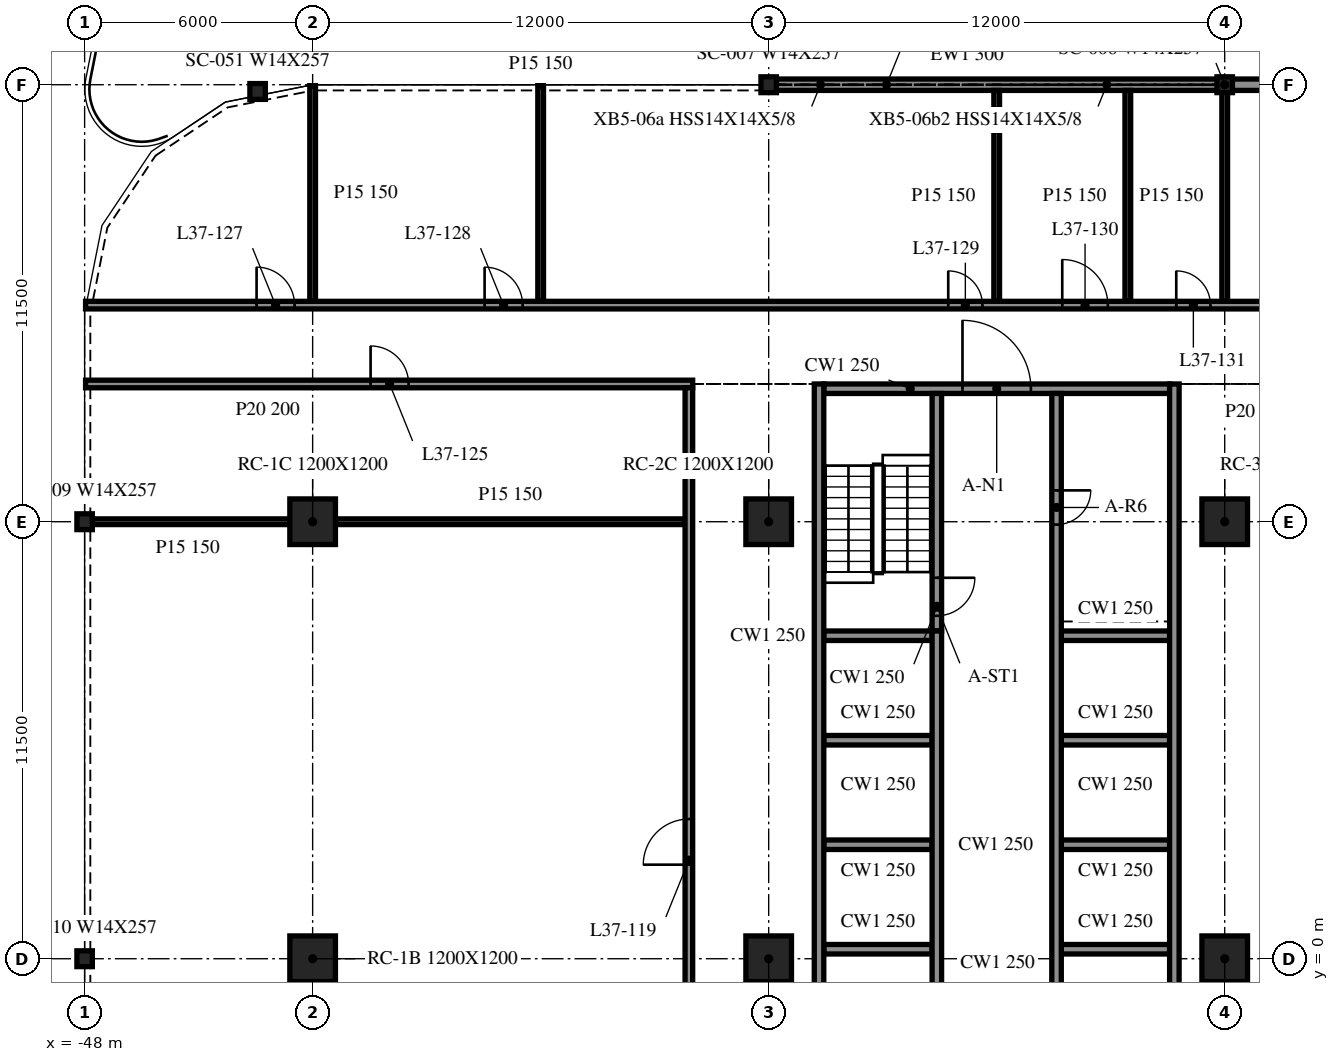
"""IFC4 building model, lengths in metres.
Left out: names, types, materials, properties, quantities, classifications, styles, units other than length and angle.
Written with IfcOpenShell. Run it as: python <this file> out.ifc"""

import sys

from ifc_helpers import new_model, si_unit, direction, frame, frame_2d, origin, origin_2d, place, context, subcontext, project, spatial, rectangle, i_section, extrude, element, fill, save


model = new_model("IFC4")
c1 = context("Model", 3, precision=1e-05, world=origin(), true_north=direction((0.0, 1.0)))
c2 = subcontext(c1, "Body", "Model", "MODEL_VIEW")
j1 = project(units=[si_unit("LENGTHUNIT", "METRE"), si_unit("PLANEANGLEUNIT", "RADIAN")], contexts=[c1])
p1 = place(None, origin())
s1 = spatial("IfcSite", under=j1, at=p1, CompositionType="ELEMENT")
p2 = place(p1, origin())
s2 = spatial("IfcBuilding", under=s1, at=p2, CompositionType="ELEMENT")
p3 = place(p2, frame((0.0, 0.0, 159.2)))
s3 = spatial("IfcBuildingStorey", under=s2, at=p3, CompositionType="ELEMENT", Elevation=159.2)
for number, where, z_axis, x_axis in (
    (1, (-42.0, 0.0, -0.34), (0.0, 0.0, 1.0), (1.0, 0.0, 0.0)),
    (2, (-42.0, 11.5, -0.34), (0.0, 0.0, 1.0), (1.0, 0.0, 0.0)),
    (3, (-30.0, 0.0, -0.34), (0.0, 0.0, 1.0), (1.0, 0.0, 0.0)),
    (4, (-30.0, 11.5, -0.34), (0.0, 0.0, 1.0), (1.0, 0.0, 0.0)),
    (5, (-18.0, 0.0, -0.34), (0.0, 0.0, 1.0), (1.0, 0.0, 0.0)),
    (6, (-18.0, 11.5, -0.34), (0.0, 0.0, 1.0), (1.0, 0.0, 0.0)),
):
    element("IfcColumn", number, at=place(p3, frame(where, z_axis=z_axis, x_axis=x_axis)), inside=s3, PredefinedType="COLUMN", context=c2, shape_type="SweptSolid", body=[
        extrude(rectangle(XDim=1.2, YDim=1.2, at=origin_2d()), origin(), (0.0, 0.0, 1.0), 3.8),
    ])
for number, where, z_axis, x_axis in (
    (7, (-18.0, 23.0, -0.34), (0.0, 0.0, 1.0), (1.0, 0.0, 0.0)),
    (8, (-30.0, 23.0, -0.34), (0.0, 0.0, 1.0), (1.0, 0.0, 0.0)),
    (9, (-43.448, 22.822, -0.34), (0.0, 0.0, 1.0), (1.0, 0.0, 0.0)),
    (10, (-48.0, 11.5, -0.34), (0.0, 0.0, 1.0), (1.0, 0.0, 0.0)),
    (11, (-48.0, 0.0, -0.34), (0.0, 0.0, 1.0), (1.0, 0.0, 0.0)),
):
    element("IfcColumn", number, at=place(p3, frame(where, z_axis=z_axis, x_axis=x_axis)), inside=s3, PredefinedType="COLUMN", context=c2, shape_type="SweptSolid", body=[
        extrude(i_section(OverallWidth=0.406, OverallDepth=0.417, WebThickness=0.03, FlangeThickness=0.048, at=origin_2d()), origin(), (0.0, 0.0, 1.0), 3.8),
    ])
p4 = place(p3, frame((-6.015, 23.0, 0.0), z_axis=(0.0, 0.0, 1.0), x_axis=(-1.0, 0.0, 0.0)))
e12 = element("IfcWall", 12, at=p4, inside=s3, PredefinedType="NOTDEFINED", context=c2, shape_type="SweptSolid", body=[
    extrude(rectangle(XDim=11.97, YDim=0.3, at=frame_2d((5.985, 0.0))), origin(), (0.0, 0.0, 1.0), 2.782),
])
p5 = place(p4, frame((4.485, 0.0, 0.0)))
e13 = element("IfcOpeningElement", 13, at=p5, cuts=e12, PredefinedType="OPENING", context=c2, shape_type="SweptSolid", body=[
    extrude(rectangle(XDim=3.0, YDim=2.4, at=frame_2d((1.5, 1.2))), frame((0.0, 0.16, 0.0), z_axis=(0.0, -1.0, 0.0), x_axis=(1.0, 0.0, 0.0)), (0.0, 0.0, 1.0), 0.32),
])
p6 = place(p3, frame((-18.015, 23.0, 0.0), z_axis=(0.0, 0.0, 1.0), x_axis=(-1.0, 0.0, 0.0)))
e14 = element("IfcWall", 14, at=p6, inside=s3, PredefinedType="NOTDEFINED", context=c2, shape_type="SweptSolid", body=[
    extrude(rectangle(XDim=11.97, YDim=0.3, at=frame_2d((5.985, 0.0))), origin(), (0.0, 0.0, 1.0), 2.782),
])
for number, where, z_axis, x_axis in (
    (15, (-28.675, 15.125, 0.0), (0.0, 0.0, 1.0), (0.0, -1.0, 0.0)),
    (16, (-19.325, -9.125, 0.0), (0.0, 0.0, 1.0), (0.0, 1.0, 0.0)),
):
    element("IfcWall", number, at=place(p3, frame(where, z_axis=z_axis, x_axis=x_axis)), inside=s3, PredefinedType="SOLIDWALL", context=c2, shape_type="SweptSolid", body=[
        extrude(rectangle(XDim=24.25, YDim=0.25, at=frame_2d((12.125, 0.0))), origin(), (0.0, 0.0, 1.0), 3.46),
    ])
p7 = place(p3, frame((-28.55, 15.0, 0.0), z_axis=(0.0, 0.0, 1.0), x_axis=(1.0, 0.0, 0.0)))
e17 = element("IfcWall", 17, at=p7, inside=s3, PredefinedType="SOLIDWALL", context=c2, shape_type="SweptSolid", body=[
    extrude(rectangle(XDim=9.1, YDim=0.25, at=frame_2d((4.55, 0.0))), origin(), (0.0, 0.0, 1.0), 3.46),
])
p8 = place(p7, frame((3.65, 0.0, 0.0)))
e18 = element("IfcOpeningElement", 18, at=p8, cuts=e17, PredefinedType="OPENING", context=c2, shape_type="SweptSolid", body=[
    extrude(rectangle(XDim=1.8, YDim=2.1, at=frame_2d((0.9, 1.05))), frame((0.0, 0.135, 0.0), z_axis=(0.0, -1.0, 0.0), x_axis=(1.0, 0.0, 0.0)), (0.0, 0.0, 1.0), 0.27),
])
p9 = place(p3, frame((-25.575, -8.875, 0.0), z_axis=(0.0, 0.0, 1.0), x_axis=(0.0, 1.0, 0.0)))
e19 = element("IfcWall", 19, at=p9, inside=s3, PredefinedType="SOLIDWALL", context=c2, shape_type="SweptSolid", body=[
    extrude(rectangle(XDim=17.5, YDim=0.25, at=frame_2d((8.75, 0.0))), origin(), (0.0, 0.0, 1.0), 3.46),
])
p10 = place(p9, frame((0.512, 0.0, 0.0)))
e20 = element("IfcOpeningElement", 20, at=p10, cuts=e19, PredefinedType="OPENING", context=c2, shape_type="SweptSolid", body=[
    extrude(rectangle(XDim=0.9, YDim=2.1, at=frame_2d((0.45, 1.05))), frame((0.0, 0.135, 0.0), z_axis=(0.0, -1.0, 0.0), x_axis=(1.0, 0.0, 0.0)), (0.0, 0.0, 1.0), 0.27),
])
p11 = place(p9, frame((3.587, 0.0, 0.0)))
e21 = element("IfcOpeningElement", 21, at=p11, cuts=e19, PredefinedType="OPENING", context=c2, shape_type="SweptSolid", body=[
    extrude(rectangle(XDim=0.9, YDim=2.1, at=frame_2d((0.45, 1.05))), frame((0.0, 0.135, 0.0), z_axis=(0.0, -1.0, 0.0), x_axis=(1.0, 0.0, 0.0)), (0.0, 0.0, 1.0), 0.27),
])
p12 = place(p3, frame((-25.575, 14.875, 0.0), z_axis=(0.0, 0.0, 1.0), x_axis=(0.0, -1.0, 0.0)))
e22 = element("IfcWall", 22, at=p12, inside=s3, PredefinedType="SOLIDWALL", context=c2, shape_type="SweptSolid", body=[
    extrude(rectangle(XDim=6.25, YDim=0.25, at=frame_2d((3.125, 0.0))), origin(), (0.0, 0.0, 1.0), 3.46),
])
p13 = place(p12, frame((4.85, 0.0, 0.0)))
e23 = element("IfcOpeningElement", 23, at=p13, cuts=e22, PredefinedType="OPENING", context=c2, shape_type="SweptSolid", body=[
    extrude(rectangle(XDim=1.0, YDim=2.1, at=frame_2d((0.5, 1.05))), frame((0.0, 0.135, 0.0), z_axis=(0.0, -1.0, 0.0), x_axis=(1.0, 0.0, 0.0)), (0.0, 0.0, 1.0), 0.27),
])
p14 = place(p3, frame((-22.425, 14.875, 0.0), z_axis=(0.0, 0.0, 1.0), x_axis=(0.0, -1.0, 0.0)))
e24 = element("IfcWall", 24, at=p14, inside=s3, PredefinedType="SOLIDWALL", context=c2, shape_type="SweptSolid", body=[
    extrude(rectangle(XDim=23.75, YDim=0.25, at=frame_2d((11.875, 0.0))), origin(), (0.0, 0.0, 1.0), 3.46),
])
p15 = place(p14, frame((22.337, 0.0, 0.0)))
e25 = element("IfcOpeningElement", 25, at=p15, cuts=e24, PredefinedType="OPENING", context=c2, shape_type="SweptSolid", body=[
    extrude(rectangle(XDim=0.9, YDim=2.1, at=frame_2d((0.45, 1.05))), frame((0.0, 0.135, 0.0), z_axis=(0.0, -1.0, 0.0), x_axis=(1.0, 0.0, 0.0)), (0.0, 0.0, 1.0), 0.27),
])
p16 = place(p14, frame((20.3, 0.0, 0.0)))
e26 = element("IfcOpeningElement", 26, at=p16, cuts=e24, PredefinedType="OPENING", context=c2, shape_type="SweptSolid", body=[
    extrude(rectangle(XDim=0.9, YDim=2.1, at=frame_2d((0.45, 1.05))), frame((0.0, 0.135, 0.0), z_axis=(0.0, -1.0, 0.0), x_axis=(1.0, 0.0, 0.0)), (0.0, 0.0, 1.0), 0.27),
])
p17 = place(p14, frame((18.262, 0.0, 0.0)))
e27 = element("IfcOpeningElement", 27, at=p17, cuts=e24, PredefinedType="OPENING", context=c2, shape_type="SweptSolid", body=[
    extrude(rectangle(XDim=0.9, YDim=2.1, at=frame_2d((0.45, 1.05))), frame((0.0, 0.135, 0.0), z_axis=(0.0, -1.0, 0.0), x_axis=(1.0, 0.0, 0.0)), (0.0, 0.0, 1.0), 0.27),
])
p18 = place(p14, frame((2.55, 0.0, 0.0)))
e28 = element("IfcOpeningElement", 28, at=p18, cuts=e24, PredefinedType="OPENING", context=c2, shape_type="SweptSolid", body=[
    extrude(rectangle(XDim=0.9, YDim=2.1, at=frame_2d((0.45, 1.05))), frame((0.0, 0.135, 0.0), z_axis=(0.0, -1.0, 0.0), x_axis=(1.0, 0.0, 0.0)), (0.0, 0.0, 1.0), 0.27),
])
for number, where, z_axis, x_axis in (
    (29, (-28.55, 0.25, 0.0), (0.0, 0.0, 1.0), (1.0, 0.0, 0.0)),
    (30, (-28.55, 3.0, 0.0), (0.0, 0.0, 1.0), (1.0, 0.0, 0.0)),
    (31, (-28.55, 5.75, 0.0), (0.0, 0.0, 1.0), (1.0, 0.0, 0.0)),
    (32, (-28.55, 8.5, 0.0), (0.0, 0.0, 1.0), (1.0, 0.0, 0.0)),
    (33, (-22.3, 0.25, 0.0), (0.0, 0.0, 1.0), (1.0, 0.0, 0.0)),
    (34, (-22.3, 3.0, 0.0), (0.0, 0.0, 1.0), (1.0, 0.0, 0.0)),
    (35, (-22.3, 5.75, 0.0), (0.0, 0.0, 1.0), (1.0, 0.0, 0.0)),
    (36, (-22.3, 8.5, 0.0), (0.0, 0.0, 1.0), (1.0, 0.0, 0.0)),
):
    element("IfcWall", number, at=place(p3, frame(where, z_axis=z_axis, x_axis=x_axis)), inside=s3, PredefinedType="SOLIDWALL", context=c2, shape_type="SweptSolid", body=[
        extrude(rectangle(XDim=2.85, YDim=0.25, at=frame_2d((1.425, 0.0))), origin(), (0.0, 0.0, 1.0), 3.46),
    ])
p19 = place(p3, frame((-47.975, 11.5, 0.0), z_axis=(0.0, 0.0, 1.0), x_axis=(1.0, 0.0, 0.0)))
e37 = element("IfcWall", 37, at=p19, inside=s3, PredefinedType="PARTITIONING", context=c2, shape_type="SweptSolid", body=[
    extrude(rectangle(XDim=5.375, YDim=0.15, at=frame_2d((2.688, 0.0))), origin(), (0.0, 0.0, 1.0), 3.46),
])
p20 = place(p3, frame((-41.4, 11.5, 0.0), z_axis=(0.0, 0.0, 1.0), x_axis=(1.0, 0.0, 0.0)))
e38 = element("IfcWall", 38, at=p20, inside=s3, PredefinedType="PARTITIONING", context=c2, shape_type="SweptSolid", body=[
    extrude(rectangle(XDim=9.2, YDim=0.15, at=frame_2d((4.6, 0.0))), origin(), (0.0, 0.0, 1.0), 3.46),
])
p21 = place(p3, frame((-47.975, 15.125, 0.0), z_axis=(0.0, 0.0, 1.0), x_axis=(1.0, 0.0, 0.0)))
e39 = element("IfcWall", 39, at=p21, inside=s3, PredefinedType="PARTITIONING", context=c2, shape_type="SweptSolid", body=[
    extrude(rectangle(XDim=15.975, YDim=0.2, at=frame_2d((7.988, 0.0))), origin(), (0.0, 0.0, 1.0), 3.46),
])
p22 = place(p21, frame((7.5, 0.0, 0.0)))
e40 = element("IfcOpeningElement", 40, at=p22, cuts=e39, PredefinedType="OPENING", context=c2, shape_type="SweptSolid", body=[
    extrude(rectangle(XDim=1.0, YDim=2.1, at=frame_2d((0.5, 1.05))), frame((0.0, 0.11, 0.0), z_axis=(0.0, -1.0, 0.0), x_axis=(1.0, 0.0, 0.0)), (0.0, 0.0, 1.0), 0.22),
])
p23 = place(p3, frame((-47.975, 17.2, 0.0), z_axis=(0.0, 0.0, 1.0), x_axis=(1.0, 0.0, 0.0)))
e41 = element("IfcWall", 41, at=p23, inside=s3, PredefinedType="PARTITIONING", context=c2, shape_type="SweptSolid", body=[
    extrude(rectangle(XDim=95.95, YDim=0.2, at=frame_2d((47.975, 0.0))), origin(), (0.0, 0.0, 1.0), 3.46),
])
p24 = place(p23, frame((4.5, 0.0, 0.0)))
e42 = element("IfcOpeningElement", 42, at=p24, cuts=e41, PredefinedType="OPENING", context=c2, shape_type="SweptSolid", body=[
    extrude(rectangle(XDim=1.0, YDim=2.1, at=frame_2d((0.5, 1.05))), frame((0.0, 0.11, 0.0), z_axis=(0.0, -1.0, 0.0), x_axis=(1.0, 0.0, 0.0)), (0.0, 0.0, 1.0), 0.22),
])
p25 = place(p23, frame((10.5, 0.0, 0.0)))
e43 = element("IfcOpeningElement", 43, at=p25, cuts=e41, PredefinedType="OPENING", context=c2, shape_type="SweptSolid", body=[
    extrude(rectangle(XDim=1.0, YDim=2.1, at=frame_2d((0.5, 1.05))), frame((0.0, 0.11, 0.0), z_axis=(0.0, -1.0, 0.0), x_axis=(1.0, 0.0, 0.0)), (0.0, 0.0, 1.0), 0.22),
])
p26 = place(p23, frame((22.7, 0.0, 0.0)))
e44 = element("IfcOpeningElement", 44, at=p26, cuts=e41, PredefinedType="OPENING", context=c2, shape_type="SweptSolid", body=[
    extrude(rectangle(XDim=0.9, YDim=2.1, at=frame_2d((0.45, 1.05))), frame((0.0, 0.11, 0.0), z_axis=(0.0, -1.0, 0.0), x_axis=(1.0, 0.0, 0.0)), (0.0, 0.0, 1.0), 0.22),
])
p27 = place(p23, frame((25.7, 0.0, 0.0)))
e45 = element("IfcOpeningElement", 45, at=p27, cuts=e41, PredefinedType="OPENING", context=c2, shape_type="SweptSolid", body=[
    extrude(rectangle(XDim=1.2, YDim=2.1, at=frame_2d((0.6, 1.05))), frame((0.0, 0.11, 0.0), z_axis=(0.0, -1.0, 0.0), x_axis=(1.0, 0.0, 0.0)), (0.0, 0.0, 1.0), 0.22),
])
p28 = place(p23, frame((28.7, 0.0, 0.0)))
e46 = element("IfcOpeningElement", 46, at=p28, cuts=e41, PredefinedType="OPENING", context=c2, shape_type="SweptSolid", body=[
    extrude(rectangle(XDim=0.9, YDim=2.1, at=frame_2d((0.45, 1.05))), frame((0.0, 0.11, 0.0), z_axis=(0.0, -1.0, 0.0), x_axis=(1.0, 0.0, 0.0)), (0.0, 0.0, 1.0), 0.22),
])
p29 = place(p23, frame((36.7, 0.0, 0.0)))
e47 = element("IfcOpeningElement", 47, at=p29, cuts=e41, PredefinedType="OPENING", context=c2, shape_type="SweptSolid", body=[
    extrude(rectangle(XDim=1.0, YDim=2.1, at=frame_2d((0.5, 1.05))), frame((0.0, 0.11, 0.0), z_axis=(0.0, -1.0, 0.0), x_axis=(1.0, 0.0, 0.0)), (0.0, 0.0, 1.0), 0.22),
])
p30 = place(p23, frame((46.5, 0.0, 0.0)))
e48 = element("IfcOpeningElement", 48, at=p30, cuts=e41, PredefinedType="OPENING", context=c2, shape_type="SweptSolid", body=[
    extrude(rectangle(XDim=1.0, YDim=2.1, at=frame_2d((0.5, 1.05))), frame((0.0, 0.11, 0.0), z_axis=(0.0, -1.0, 0.0), x_axis=(1.0, 0.0, 0.0)), (0.0, 0.0, 1.0), 0.22),
])
p31 = place(p23, frame((48.1, 0.0, 0.0)))
e49 = element("IfcOpeningElement", 49, at=p31, cuts=e41, PredefinedType="OPENING", context=c2, shape_type="SweptSolid", body=[
    extrude(rectangle(XDim=0.9, YDim=2.1, at=frame_2d((0.45, 1.05))), frame((0.0, 0.11, 0.0), z_axis=(0.0, -1.0, 0.0), x_axis=(1.0, 0.0, 0.0)), (0.0, 0.0, 1.0), 0.22),
])
p32 = place(p23, frame((51.5, 0.0, 0.0)))
e50 = element("IfcOpeningElement", 50, at=p32, cuts=e41, PredefinedType="OPENING", context=c2, shape_type="SweptSolid", body=[
    extrude(rectangle(XDim=1.2, YDim=2.1, at=frame_2d((0.6, 1.05))), frame((0.0, 0.11, 0.0), z_axis=(0.0, -1.0, 0.0), x_axis=(1.0, 0.0, 0.0)), (0.0, 0.0, 1.0), 0.22),
])
p33 = place(p23, frame((54.1, 0.0, 0.0)))
e51 = element("IfcOpeningElement", 51, at=p33, cuts=e41, PredefinedType="OPENING", context=c2, shape_type="SweptSolid", body=[
    extrude(rectangle(XDim=0.9, YDim=2.1, at=frame_2d((0.45, 1.05))), frame((0.0, 0.11, 0.0), z_axis=(0.0, -1.0, 0.0), x_axis=(1.0, 0.0, 0.0)), (0.0, 0.0, 1.0), 0.22),
])
p34 = place(p23, frame((62.3, 0.0, 0.0)))
e52 = element("IfcOpeningElement", 52, at=p34, cuts=e41, PredefinedType="OPENING", context=c2, shape_type="SweptSolid", body=[
    extrude(rectangle(XDim=1.0, YDim=2.1, at=frame_2d((0.5, 1.05))), frame((0.0, 0.11, 0.0), z_axis=(0.0, -1.0, 0.0), x_axis=(1.0, 0.0, 0.0)), (0.0, 0.0, 1.0), 0.22),
])
p35 = place(p23, frame((74.3, 0.0, 0.0)))
e53 = element("IfcOpeningElement", 53, at=p35, cuts=e41, PredefinedType="OPENING", context=c2, shape_type="SweptSolid", body=[
    extrude(rectangle(XDim=1.0, YDim=2.1, at=frame_2d((0.5, 1.05))), frame((0.0, 0.11, 0.0), z_axis=(0.0, -1.0, 0.0), x_axis=(1.0, 0.0, 0.0)), (0.0, 0.0, 1.0), 0.22),
])
p36 = place(p23, frame((78.1, 0.0, 0.0)))
e54 = element("IfcOpeningElement", 54, at=p36, cuts=e41, PredefinedType="OPENING", context=c2, shape_type="SweptSolid", body=[
    extrude(rectangle(XDim=0.9, YDim=2.1, at=frame_2d((0.45, 1.05))), frame((0.0, 0.11, 0.0), z_axis=(0.0, -1.0, 0.0), x_axis=(1.0, 0.0, 0.0)), (0.0, 0.0, 1.0), 0.22),
])
p37 = place(p23, frame((84.1, 0.0, 0.0)))
e55 = element("IfcOpeningElement", 55, at=p37, cuts=e41, PredefinedType="OPENING", context=c2, shape_type="SweptSolid", body=[
    extrude(rectangle(XDim=1.2, YDim=2.1, at=frame_2d((0.6, 1.05))), frame((0.0, 0.11, 0.0), z_axis=(0.0, -1.0, 0.0), x_axis=(1.0, 0.0, 0.0)), (0.0, 0.0, 1.0), 0.22),
])
for number, where, z_axis, x_axis in (
    (56, (-42.0, 17.3, 0.0), (0.0, 0.0, 1.0), (0.0, 1.0, 0.0)),
    (57, (-36.0, 17.3, 0.0), (0.0, 0.0, 1.0), (0.0, 1.0, 0.0)),
):
    element("IfcWall", number, at=place(p3, frame(where, z_axis=z_axis, x_axis=x_axis)), inside=s3, PredefinedType="PARTITIONING", context=c2, shape_type="SweptSolid", body=[
        extrude(rectangle(XDim=5.675, YDim=0.15, at=frame_2d((2.837, 0.0))), origin(), (0.0, 0.0, 1.0), 3.46),
    ])
p38 = place(p3, frame((-32.1, -9.025, 0.0), z_axis=(0.0, 0.0, 1.0), x_axis=(0.0, 1.0, 0.0)))
e58 = element("IfcWall", 58, at=p38, inside=s3, PredefinedType="PARTITIONING", context=c2, shape_type="SweptSolid", body=[
    extrude(rectangle(XDim=24.05, YDim=0.2, at=frame_2d((12.025, 0.0))), origin(), (0.0, 0.0, 1.0), 3.46),
])
p39 = place(p38, frame((11.5, 0.0, 0.0)))
e59 = element("IfcOpeningElement", 59, at=p39, cuts=e58, PredefinedType="OPENING", context=c2, shape_type="SweptSolid", body=[
    extrude(rectangle(XDim=1.2, YDim=2.1, at=frame_2d((0.6, 1.05))), frame((0.0, 0.11, 0.0), z_axis=(0.0, -1.0, 0.0), x_axis=(1.0, 0.0, 0.0)), (0.0, 0.0, 1.0), 0.22),
])
for number, where, z_axis, x_axis in (
    (60, (-24.0, 17.3, 0.0), (0.0, 0.0, 1.0), (0.0, 1.0, 0.0)),
    (61, (-20.55, 17.3, 0.0), (0.0, 0.0, 1.0), (0.0, 1.0, 0.0)),
    (62, (-18.0, 17.3, 0.0), (0.0, 0.0, 1.0), (0.0, 1.0, 0.0)),
):
    element("IfcWall", number, at=place(p3, frame(where, z_axis=z_axis, x_axis=x_axis)), inside=s3, PredefinedType="PARTITIONING", context=c2, shape_type="SweptSolid", body=[
        extrude(rectangle(XDim=5.55, YDim=0.15, at=frame_2d((2.775, 0.0))), origin(), (0.0, 0.0, 1.0), 3.46),
    ])
p40 = place(p8, origin())
e63 = element("IfcDoor", 63, at=p40, inside=s3, OperationType="DOUBLE_DOOR_SINGLE_SWING", PredefinedType="DOOR", context=c2, shape_type="SweptSolid", body=[
    extrude(rectangle(XDim=1.8, YDim=2.1, at=frame_2d((0.9, 1.05))), frame((0.0, 0.025, 0.0), z_axis=(0.0, -1.0, 0.0), x_axis=(1.0, 0.0, 0.0)), (0.0, 0.0, 1.0), 0.05),
])
fill(e18, e63)
p41 = place(p18, origin())
e64 = element("IfcDoor", 64, at=p41, inside=s3, OperationType="SINGLE_SWING_RIGHT", PredefinedType="DOOR", context=c2, shape_type="SweptSolid", body=[
    extrude(rectangle(XDim=0.9, YDim=2.1, at=frame_2d((0.45, 1.05))), frame((0.0, 0.025, 0.0), z_axis=(0.0, -1.0, 0.0), x_axis=(1.0, 0.0, 0.0)), (0.0, 0.0, 1.0), 0.05),
])
fill(e28, e64)
p42 = place(p13, origin())
e65 = element("IfcDoor", 65, at=p42, inside=s3, OperationType="SINGLE_SWING_LEFT", PredefinedType="DOOR", context=c2, shape_type="SweptSolid", body=[
    extrude(rectangle(XDim=1.0, YDim=2.1, at=frame_2d((0.5, 1.05))), frame((0.0, 0.025, 0.0), z_axis=(0.0, -1.0, 0.0), x_axis=(1.0, 0.0, 0.0)), (0.0, 0.0, 1.0), 0.05),
])
fill(e23, e65)
p43 = place(p39, origin())
e66 = element("IfcDoor", 66, at=p43, inside=s3, OperationType="SINGLE_SWING_RIGHT", PredefinedType="DOOR", context=c2, shape_type="SweptSolid", body=[
    extrude(rectangle(XDim=1.2, YDim=2.1, at=frame_2d((0.6, 1.05))), frame((0.0, 0.025, 0.0), z_axis=(0.0, -1.0, 0.0), x_axis=(1.0, 0.0, 0.0)), (0.0, 0.0, 1.0), 0.05),
])
fill(e59, e66)
p44 = place(p22, origin())
e67 = element("IfcDoor", 67, at=p44, inside=s3, OperationType="SINGLE_SWING_LEFT", PredefinedType="DOOR", context=c2, shape_type="SweptSolid", body=[
    extrude(rectangle(XDim=1.0, YDim=2.1, at=frame_2d((0.5, 1.05))), frame((0.0, 0.025, 0.0), z_axis=(0.0, -1.0, 0.0), x_axis=(1.0, 0.0, 0.0)), (0.0, 0.0, 1.0), 0.05),
])
fill(e40, e67)
p45 = place(p24, origin())
e68 = element("IfcDoor", 68, at=p45, inside=s3, OperationType="SINGLE_SWING_LEFT", PredefinedType="DOOR", context=c2, shape_type="SweptSolid", body=[
    extrude(rectangle(XDim=1.0, YDim=2.1, at=frame_2d((0.5, 1.05))), frame((0.0, 0.025, 0.0), z_axis=(0.0, -1.0, 0.0), x_axis=(1.0, 0.0, 0.0)), (0.0, 0.0, 1.0), 0.05),
])
fill(e42, e68)
p46 = place(p25, origin())
e69 = element("IfcDoor", 69, at=p46, inside=s3, OperationType="SINGLE_SWING_LEFT", PredefinedType="DOOR", context=c2, shape_type="SweptSolid", body=[
    extrude(rectangle(XDim=1.0, YDim=2.1, at=frame_2d((0.5, 1.05))), frame((0.0, 0.025, 0.0), z_axis=(0.0, -1.0, 0.0), x_axis=(1.0, 0.0, 0.0)), (0.0, 0.0, 1.0), 0.05),
])
fill(e43, e69)
p47 = place(p26, origin())
e70 = element("IfcDoor", 70, at=p47, inside=s3, OperationType="SINGLE_SWING_LEFT", PredefinedType="DOOR", context=c2, shape_type="SweptSolid", body=[
    extrude(rectangle(XDim=0.9, YDim=2.1, at=frame_2d((0.45, 1.05))), frame((0.0, 0.025, 0.0), z_axis=(0.0, -1.0, 0.0), x_axis=(1.0, 0.0, 0.0)), (0.0, 0.0, 1.0), 0.05),
])
fill(e44, e70)
p48 = place(p27, origin())
e71 = element("IfcDoor", 71, at=p48, inside=s3, OperationType="SINGLE_SWING_LEFT", PredefinedType="DOOR", context=c2, shape_type="SweptSolid", body=[
    extrude(rectangle(XDim=1.2, YDim=2.1, at=frame_2d((0.6, 1.05))), frame((0.0, 0.025, 0.0), z_axis=(0.0, -1.0, 0.0), x_axis=(1.0, 0.0, 0.0)), (0.0, 0.0, 1.0), 0.05),
])
fill(e45, e71)
p49 = place(p28, origin())
e72 = element("IfcDoor", 72, at=p49, inside=s3, OperationType="SINGLE_SWING_LEFT", PredefinedType="DOOR", context=c2, shape_type="SweptSolid", body=[
    extrude(rectangle(XDim=0.9, YDim=2.1, at=frame_2d((0.45, 1.05))), frame((0.0, 0.025, 0.0), z_axis=(0.0, -1.0, 0.0), x_axis=(1.0, 0.0, 0.0)), (0.0, 0.0, 1.0), 0.05),
])
fill(e46, e72)
save(model, sys.argv[1])
